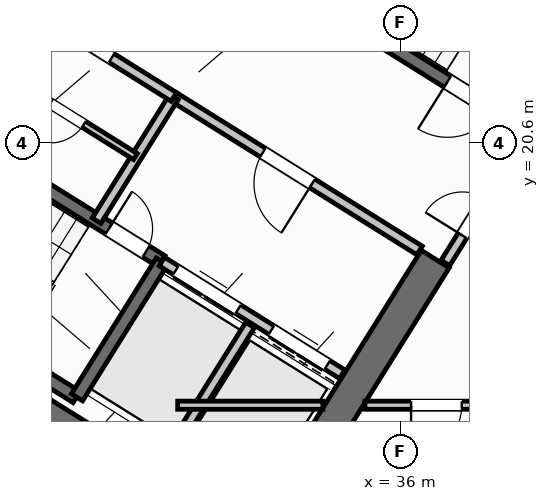
"""IFC4 building model, lengths in metres.
Left out: names, types, materials, properties, quantities, classifications, styles, units other than length and angle.
Written with IfcOpenShell. Run it as: python <this file> out.ifc"""

import sys

from ifc_helpers import new_model, si_unit, direction, frame, frame_2d, origin, place, context, subcontext, project, spatial, rectangle, extrude, source, transform, mapped, element, fill, save


model = new_model("IFC4")
c1 = context("Model", 3, precision=1e-05, world=origin(), true_north=direction((0.0, 1.0)))
c2 = subcontext(c1, "Body", "Model", "MODEL_VIEW")
j1 = project(units=[si_unit("LENGTHUNIT", "METRE"), si_unit("PLANEANGLEUNIT", "RADIAN")], contexts=[c1])
p1 = place(None, origin())
s1 = spatial("IfcSite", under=j1, at=p1, CompositionType="ELEMENT")
p2 = place(p1, origin())
s2 = spatial("IfcBuilding", under=s1, at=p2, CompositionType="ELEMENT")
p3 = place(p2, frame((0.0, 0.0, 38.4)))
s3 = spatial("IfcBuildingStorey", under=s2, at=p3, CompositionType="ELEMENT", Elevation=38.4)
p4 = place(p3, frame((33.409, 12.45, 0.0), z_axis=(0.0, 0.0, 1.0), x_axis=(-0.848051132073, 0.529914405721, 0.0)))
e1 = element("IfcWall", 1, at=p4, inside=s3, PredefinedType="SHEAR", context=c2, shape_type="SweptSolid", body=[
    extrude(rectangle(XDim=13.24, YDim=0.65, at=frame_2d((6.62, 0.0))), origin(), (0.0, 0.0, 1.0), 3.35),
])
p5 = place(p3, frame((36.683, 18.304, 0.0), z_axis=(0.0, 0.0, 1.0), x_axis=(-0.529899109053, -0.848060690178, 0.0)))
e2 = element("IfcWall", 2, at=p5, inside=s3, PredefinedType="SHEAR", context=c2, shape_type="SweptSolid", body=[
    extrude(rectangle(XDim=6.375, YDim=0.65, at=frame_2d((3.188, 0.0))), origin(), (0.0, 0.0, 1.0), 3.35),
])
p6 = place(p3, frame((29.268, 6.429, 0.0), z_axis=(0.0, 0.0, 1.0), x_axis=(-0.848049971435, 0.529916263149, 0.0)))
e3 = element("IfcWall", 3, at=p6, inside=s3, PredefinedType="STANDARD", context=c2, shape_type="SweptSolid", body=[
    extrude(rectangle(XDim=31.588, YDim=0.32, at=frame_2d((15.794, 0.0))), origin(), (0.0, 0.0, 1.0), 3.35),
])
p7 = place(p6, frame((16.362, 0.0, 0.0)))
e4 = element("IfcOpeningElement", 4, at=p7, cuts=e3, PredefinedType="OPENING", context=c2, shape_type="SweptSolid", body=[
    extrude(rectangle(XDim=1.2, YDim=2.15, at=frame_2d((0.6, 1.075))), frame((0.0, 0.17, 0.0), z_axis=(0.0, -1.0, 0.0), x_axis=(1.0, 0.0, 0.0)), (0.0, 0.0, 1.0), 0.34),
])
p8 = place(p6, frame((2.989, 0.0, 0.8)))
e5 = element("IfcOpeningElement", 5, at=p8, cuts=e3, PredefinedType="OPENING", context=c2, shape_type="SweptSolid", body=[
    extrude(rectangle(XDim=2.1, YDim=1.55, at=frame_2d((1.05, 0.775))), frame((0.0, 0.17, 0.0), z_axis=(0.0, -1.0, 0.0), x_axis=(1.0, 0.0, 0.0)), (0.0, 0.0, 1.0), 0.34),
])
p9 = place(p6, frame((8.359, 0.0, 0.8)))
e6 = element("IfcOpeningElement", 6, at=p9, cuts=e3, PredefinedType="OPENING", context=c2, shape_type="SweptSolid", body=[
    extrude(rectangle(XDim=2.1, YDim=1.55, at=frame_2d((1.05, 0.775))), frame((0.0, 0.17, 0.0), z_axis=(0.0, -1.0, 0.0), x_axis=(1.0, 0.0, 0.0)), (0.0, 0.0, 1.0), 0.34),
])
p10 = place(p6, frame((13.284, 0.0, 0.95)))
e7 = element("IfcOpeningElement", 7, at=p10, cuts=e3, PredefinedType="OPENING", context=c2, shape_type="SweptSolid", body=[
    extrude(rectangle(XDim=1.2, YDim=1.4, at=frame_2d((0.6, 0.7))), frame((0.0, 0.17, 0.0), z_axis=(0.0, -1.0, 0.0), x_axis=(1.0, 0.0, 0.0)), (0.0, 0.0, 1.0), 0.34),
])
p11 = place(p6, frame((20.39, 0.0, 0.95)))
e8 = element("IfcOpeningElement", 8, at=p11, cuts=e3, PredefinedType="OPENING", context=c2, shape_type="SweptSolid", body=[
    extrude(rectangle(XDim=1.2, YDim=1.4, at=frame_2d((0.6, 0.7))), frame((0.0, 0.17, 0.0), z_axis=(0.0, -1.0, 0.0), x_axis=(1.0, 0.0, 0.0)), (0.0, 0.0, 1.0), 0.34),
])
p12 = place(p6, frame((23.715, 0.0, 1.0)))
e9 = element("IfcOpeningElement", 9, at=p12, cuts=e3, PredefinedType="OPENING", context=c2, shape_type="SweptSolid", body=[
    extrude(rectangle(XDim=0.9, YDim=1.25, at=frame_2d((0.45, 0.625))), frame((0.0, 0.17, 0.0), z_axis=(0.0, -1.0, 0.0), x_axis=(1.0, 0.0, 0.0)), (0.0, 0.0, 1.0), 0.34),
])
p13 = place(p6, frame((27.481, 0.0, 0.8)))
e10 = element("IfcOpeningElement", 10, at=p13, cuts=e3, PredefinedType="OPENING", context=c2, shape_type="SweptSolid", body=[
    extrude(rectangle(XDim=2.1, YDim=1.55, at=frame_2d((1.05, 0.775))), frame((0.0, 0.17, 0.0), z_axis=(0.0, -1.0, 0.0), x_axis=(1.0, 0.0, 0.0)), (0.0, 0.0, 1.0), 0.34),
])
p14 = place(p3, frame((29.605, 15.581, 0.0), z_axis=(0.0, 0.0, 1.0), x_axis=(-0.848036911448, 0.529937163087, 0.0)))
e11 = element("IfcWall", 11, at=p14, inside=s3, PredefinedType="SHEAR", context=c2, shape_type="SweptSolid", body=[
    extrude(rectangle(XDim=7.46, YDim=0.26, at=frame_2d((3.73, 0.0))), origin(), (0.0, 0.0, 1.0), 3.35),
])
p15 = place(p3, frame((31.28, 18.261, 0.0), z_axis=(0.0, 0.0, 1.0), x_axis=(-0.848051618787, 0.529913626805, 0.0)))
e12 = element("IfcWall", 12, at=p15, inside=s3, PredefinedType="SHEAR", context=c2, shape_type="SweptSolid", body=[
    extrude(rectangle(XDim=7.46, YDim=0.26, at=frame_2d((3.73, 0.0))), origin(), (0.0, 0.0, 1.0), 3.35),
])
p16 = place(p15, frame((0.36, 0.0, 0.0)))
e13 = element("IfcOpeningElement", 13, at=p16, cuts=e12, PredefinedType="OPENING", context=c2, shape_type="SweptSolid", body=[
    extrude(rectangle(XDim=0.86, YDim=2.05, at=frame_2d((0.43, 1.025))), frame((0.0, 0.14, 0.0), z_axis=(0.0, -1.0, 0.0), x_axis=(1.0, 0.0, 0.0)), (0.0, 0.0, 1.0), 0.28),
])
p17 = place(p3, frame((31.288, 18.256, 0.0), z_axis=(0.0, 0.0, 1.0), x_axis=(-0.529943379326, -0.848033026897, 0.0)))
e14 = element("IfcWall", 14, at=p17, inside=s3, PredefinedType="SHEAR", context=c2, shape_type="SweptSolid", body=[
    extrude(rectangle(XDim=3.16, YDim=0.26, at=frame_2d((1.58, 0.0))), origin(), (0.0, 0.0, 1.0), 3.35),
])
p18 = place(p3, frame((38.046, 21.108, 0.0), z_axis=(0.0, 0.0, 1.0), x_axis=(-0.848054434086, 0.529909121291, 0.0)))
e15 = element("IfcWall", 15, at=p18, inside=s3, PredefinedType="SHEAR", context=c2, shape_type="SweptSolid", body=[
    extrude(rectangle(XDim=7.33, YDim=0.26, at=frame_2d((3.665, 0.0))), origin(), (0.0, 0.0, 1.0), 3.35),
])
p19 = place(p18, frame((0.22, 0.0, 0.0)))
e16 = element("IfcOpeningElement", 16, at=p19, cuts=e15, PredefinedType="OPENING", context=c2, shape_type="SweptSolid", body=[
    extrude(rectangle(XDim=1.1, YDim=2.1, at=frame_2d((0.55, 1.05))), frame((0.0, 0.14, 0.0), z_axis=(0.0, -1.0, 0.0), x_axis=(1.0, 0.0, 0.0)), (0.0, 0.0, 1.0), 0.28),
])
p20 = place(p3, frame((34.848, 16.031, 0.0), z_axis=(0.0, 0.0, 1.0), x_axis=(-0.848044042236, 0.529925751807, 0.0)))
e17 = element("IfcWall", 17, at=p20, inside=s3, PredefinedType="STANDARD", context=c2, shape_type="SweptSolid", body=[
    extrude(rectangle(XDim=4.198, YDim=0.2, at=frame_2d((2.099, 0.0))), origin(), (0.0, 0.0, 1.0), 3.34),
])
p21 = place(p20, frame((0.348, 0.0, 0.0)))
e18 = element("IfcOpeningElement", 18, at=p21, cuts=e17, PredefinedType="OPENING", context=c2, shape_type="SweptSolid", body=[
    extrude(rectangle(XDim=1.3, YDim=2.2, at=frame_2d((0.65, 1.1))), frame((0.0, 0.11, 0.0), z_axis=(0.0, -1.0, 0.0), x_axis=(1.0, 0.0, 0.0)), (0.0, 0.0, 1.0), 0.22),
])
p22 = place(p20, frame((2.423, 0.0, 0.0)))
e19 = element("IfcOpeningElement", 19, at=p22, cuts=e17, PredefinedType="OPENING", context=c2, shape_type="SweptSolid", body=[
    extrude(rectangle(XDim=1.45, YDim=2.25, at=frame_2d((0.725, 1.125))), frame((0.0, 0.11, 0.0), z_axis=(0.0, -1.0, 0.0), x_axis=(1.0, 0.0, 0.0)), (0.0, 0.0, 1.0), 0.22),
])
p23 = place(p3, frame((36.374, 18.474, 0.0), z_axis=(0.0, 0.0, 1.0), x_axis=(-0.848051071577, 0.529914502535, 0.0)))
e20 = element("IfcWall", 20, at=p23, inside=s3, PredefinedType="STANDARD", context=c2, shape_type="SweptSolid", body=[
    extrude(rectangle(XDim=5.718, YDim=0.2, at=frame_2d((2.859, 0.0))), origin(), (0.0, 0.0, 1.0), 3.34),
])
p24 = place(p23, frame((2.498, 0.0, 0.0)))
e21 = element("IfcOpeningElement", 21, at=p24, cuts=e20, PredefinedType="OPENING", context=c2, shape_type="SweptSolid", body=[
    extrude(rectangle(XDim=1.15, YDim=2.1, at=frame_2d((0.575, 1.05))), frame((0.0, 0.11, 0.0), z_axis=(0.0, -1.0, 0.0), x_axis=(1.0, 0.0, 0.0)), (0.0, 0.0, 1.0), 0.22),
])
p25 = place(p3, frame((33.029, 17.003, 0.0), z_axis=(0.0, 0.0, 1.0), x_axis=(-0.529916267533, -0.848049968695, 0.0)))
e22 = element("IfcWall", 22, at=p25, inside=s3, PredefinedType="STANDARD", context=c2, shape_type="SweptSolid", body=[
    extrude(rectangle(XDim=2.92, YDim=0.2, at=frame_2d((1.46, 0.0))), origin(), (0.0, 0.0, 1.0), 3.34),
])
p26 = place(p3, frame((31.525, 21.504, 0.0), z_axis=(0.0, 0.0, 1.0), x_axis=(-0.529907497854, -0.848055448493, 0.0)))
e23 = element("IfcWall", 23, at=p26, inside=s3, PredefinedType="STANDARD", context=c2, shape_type="SweptSolid", body=[
    extrude(rectangle(XDim=2.88, YDim=0.2, at=frame_2d((1.44, 0.0))), origin(), (0.0, 0.0, 1.0), 3.34),
])
p27 = place(p3, frame((31.525, 21.504, 0.0), z_axis=(0.0, 0.0, 1.0), x_axis=(-0.848044998614, 0.529924221305, 0.0)))
e24 = element("IfcWall", 24, at=p27, inside=s3, PredefinedType="STANDARD", context=c2, shape_type="SweptSolid", body=[
    extrude(rectangle(XDim=6.168, YDim=0.2, at=frame_2d((3.084, 0.0))), origin(), (0.0, 0.0, 1.0), 3.34),
])
p28 = place(p27, frame((4.4, 0.0, 0.0)))
e25 = element("IfcOpeningElement", 25, at=p28, cuts=e24, PredefinedType="OPENING", context=c2, shape_type="SweptSolid", body=[
    extrude(rectangle(XDim=0.86, YDim=2.05, at=frame_2d((0.43, 1.025))), frame((0.0, 0.11, 0.0), z_axis=(0.0, -1.0, 0.0), x_axis=(1.0, 0.0, 0.0)), (0.0, 0.0, 1.0), 0.22),
])
p29 = place(p27, frame((1.45, 0.0, 0.0)))
e26 = element("IfcOpeningElement", 26, at=p29, cuts=e24, PredefinedType="OPENING", context=c2, shape_type="SweptSolid", body=[
    extrude(rectangle(XDim=0.86, YDim=2.05, at=frame_2d((0.43, 1.025))), frame((0.0, 0.11, 0.0), z_axis=(0.0, -1.0, 0.0), x_axis=(1.0, 0.0, 0.0)), (0.0, 0.0, 1.0), 0.22),
])
p30 = place(p3, frame((30.766, 20.327, 0.0), z_axis=(0.0, 0.0, 1.0), x_axis=(-0.848052663127, 0.529911955482, 0.0)))
e27 = element("IfcWall", 27, at=p30, inside=s3, PredefinedType="PLUMBINGWALL", context=c2, shape_type="SweptSolid", body=[
    extrude(rectangle(XDim=3.28, YDim=0.14, at=frame_2d((1.64, 0.0))), origin(), (0.0, 0.0, 1.0), 3.34),
])
p31 = place(p30, frame((1.2, 0.0, 0.0)))
e28 = element("IfcOpeningElement", 28, at=p31, cuts=e27, PredefinedType="OPENING", context=c2, shape_type="SweptSolid", body=[
    extrude(rectangle(XDim=0.78, YDim=2.05, at=frame_2d((0.39, 1.025))), frame((0.0, 0.08, 0.0), z_axis=(0.0, -1.0, 0.0), x_axis=(1.0, 0.0, 0.0)), (0.0, 0.0, 1.0), 0.16),
])
p32 = place(p3, frame((32.164, 10.374, 0.0), z_axis=(0.0, 0.0, 1.0), x_axis=(-0.848044107957, 0.529925646633, 0.0)))
e29 = element("IfcWall", 29, at=p32, inside=s3, PredefinedType="PARTITIONING", context=c2, shape_type="SweptSolid", body=[
    extrude(rectangle(XDim=15.57, YDim=0.16, at=frame_2d((7.785, 0.0))), origin(), (0.0, 0.0, 1.0), 3.34),
])
p33 = place(p32, frame((10.83, 0.0, 0.0)))
e30 = element("IfcOpeningElement", 30, at=p33, cuts=e29, PredefinedType="OPENING", context=c2, shape_type="SweptSolid", body=[
    extrude(rectangle(XDim=1.0, YDim=2.1, at=frame_2d((0.5, 1.05))), frame((0.0, 0.09, 0.0), z_axis=(0.0, -1.0, 0.0), x_axis=(1.0, 0.0, 0.0)), (0.0, 0.0, 1.0), 0.18),
])
p34 = place(p3, frame((29.72, 8.859, 0.0), z_axis=(0.0, 0.0, 1.0), x_axis=(-0.848049134363, 0.529917602752, 0.0)))
e31 = element("IfcWall", 31, at=p34, inside=s3, PredefinedType="PLUMBINGWALL", context=c2, shape_type="SweptSolid", body=[
    extrude(rectangle(XDim=14.3, YDim=0.14, at=frame_2d((7.15, 0.0))), origin(), (0.0, 0.0, 1.0), 3.34),
])
p35 = place(p34, frame((9.57, 0.0, 0.0)))
e32 = element("IfcOpeningElement", 32, at=p35, cuts=e31, PredefinedType="OPENING", context=c2, shape_type="SweptSolid", body=[
    extrude(rectangle(XDim=0.92, YDim=2.08, at=frame_2d((0.46, 1.04))), frame((0.0, 0.08, 0.0), z_axis=(0.0, -1.0, 0.0), x_axis=(1.0, 0.0, 0.0)), (0.0, 0.0, 1.0), 0.16),
])
p36 = place(p3, frame((38.451, 20.737, 0.0), z_axis=(0.0, 0.0, 1.0), x_axis=(-0.529924799939, -0.848044637038, 0.0)))
e33 = element("IfcWall", 33, at=p36, inside=s3, PredefinedType="STANDARD", context=c2, shape_type="SweptSolid", body=[
    extrude(rectangle(XDim=2.96, YDim=0.2, at=frame_2d((1.48, 0.0))), origin(), (0.0, 0.0, 1.0), 3.34),
])
p37 = place(p36, frame((1.46, 0.0, 0.0)))
e34 = element("IfcOpeningElement", 34, at=p37, cuts=e33, PredefinedType="OPENING", context=c2, shape_type="SweptSolid", body=[
    extrude(rectangle(XDim=0.86, YDim=2.05, at=frame_2d((0.43, 1.025))), frame((0.0, 0.11, 0.0), z_axis=(0.0, -1.0, 0.0), x_axis=(1.0, 0.0, 0.0)), (0.0, 0.0, 1.0), 0.22),
])
p38 = place(p3, frame((31.6, 15.42, 0.0), z_axis=(0.0, 0.0, 1.0), x_axis=(1.0, 0.0, 0.0)))
e35 = element("IfcWall", 35, at=p38, inside=s3, PredefinedType="PARTITIONING", context=c2, shape_type="SweptSolid", body=[
    extrude(rectangle(XDim=2.866, YDim=0.16, at=frame_2d((1.433, 0.0))), origin(), (0.0, 0.0, 1.0), 3.34),
])
p39 = place(p3, frame((35.296, 15.42, 0.0), z_axis=(0.0, 0.0, 1.0), x_axis=(1.0, 0.0, 0.0)))
e36 = element("IfcWall", 36, at=p39, inside=s3, PredefinedType="PARTITIONING", context=c2, shape_type="SweptSolid", body=[
    extrude(rectangle(XDim=15.311, YDim=0.16, at=frame_2d((7.655, 0.0))), origin(), (0.0, 0.0, 1.0), 3.34),
])
p40 = place(p39, frame((0.91, 0.0, 0.0)))
e37 = element("IfcOpeningElement", 37, at=p40, cuts=e36, PredefinedType="OPENING", context=c2, shape_type="SweptSolid", body=[
    extrude(rectangle(XDim=1.0, YDim=2.1, at=frame_2d((0.5, 1.05))), frame((0.0, 0.09, 0.0), z_axis=(0.0, -1.0, 0.0), x_axis=(1.0, 0.0, 0.0)), (0.0, 0.0, 1.0), 0.18),
])
p41 = place(p39, frame((8.74, 0.0, 0.0)))
e38 = element("IfcOpeningElement", 38, at=p41, cuts=e36, PredefinedType="OPENING", context=c2, shape_type="SweptSolid", body=[
    extrude(rectangle(XDim=1.0, YDim=2.1, at=frame_2d((0.5, 1.05))), frame((0.0, 0.09, 0.0), z_axis=(0.0, -1.0, 0.0), x_axis=(1.0, 0.0, 0.0)), (0.0, 0.0, 1.0), 0.18),
])
m1 = source(origin(), c2, "Body", "SweptSolid", [
    extrude(rectangle(XDim=0.86, YDim=2.05, at=frame_2d((0.43, 1.025))), frame((0.0, 0.025, 0.0), z_axis=(0.0, -1.0, 0.0), x_axis=(1.0, 0.0, 0.0)), (0.0, 0.0, 1.0), 0.05),
])
p42 = place(p16, frame((0.86, 0.0, 0.0), z_axis=(0.0, 0.0, 1.0), x_axis=(-1.0, 0.0, 0.0)))
e39 = element("IfcDoor", 39, at=p42, inside=s3, OperationType="SINGLE_SWING_LEFT", PredefinedType="DOOR", context=c2, shape_type="MappedRepresentation", body=[
    mapped(m1, transform((0.0, 0.0, 0.0), scale=1.0)),
])
fill(e13, e39)
m2 = source(origin(), c2, "Body", "SweptSolid", [
    extrude(rectangle(XDim=1.1, YDim=2.1, at=frame_2d((0.55, 1.05))), frame((0.0, 0.025, 0.0), z_axis=(0.0, -1.0, 0.0), x_axis=(1.0, 0.0, 0.0)), (0.0, 0.0, 1.0), 0.05),
])
p43 = place(p19, origin())
e40 = element("IfcDoor", 40, at=p43, inside=s3, OperationType="SINGLE_SWING_RIGHT", PredefinedType="DOOR", context=c2, shape_type="MappedRepresentation", body=[
    mapped(m2, transform((0.0, 0.0, 0.0), scale=1.0)),
])
fill(e16, e40)
m3 = source(origin(), c2, "Body", "SweptSolid", [
    extrude(rectangle(XDim=1.15, YDim=2.1, at=frame_2d((0.575, 1.05))), frame((0.0, 0.025, 0.0), z_axis=(0.0, -1.0, 0.0), x_axis=(1.0, 0.0, 0.0)), (0.0, 0.0, 1.0), 0.05),
])
p44 = place(p24, origin())
e41 = element("IfcDoor", 41, at=p44, inside=s3, OperationType="SINGLE_SWING_LEFT", PredefinedType="DOOR", context=c2, shape_type="MappedRepresentation", body=[
    mapped(m3, transform((0.0, 0.0, 0.0), scale=1.0)),
])
fill(e21, e41)
m4 = source(origin(), c2, "Body", "SweptSolid", [
    extrude(rectangle(XDim=1.3, YDim=2.2, at=frame_2d((0.65, 1.1))), frame((0.0, 0.025, 0.0), z_axis=(0.0, -1.0, 0.0), x_axis=(1.0, 0.0, 0.0)), (0.0, 0.0, 1.0), 0.05),
])
p45 = place(p21, origin())
e42 = element("IfcDoor", 42, at=p45, inside=s3, OperationType="DOUBLE_DOOR_SLIDING", PredefinedType="DOOR", context=c2, shape_type="MappedRepresentation", body=[
    mapped(m4, transform((0.0, 0.0, 0.0), scale=1.0)),
])
fill(e18, e42)
m5 = source(origin(), c2, "Body", "SweptSolid", [
    extrude(rectangle(XDim=1.45, YDim=2.25, at=frame_2d((0.725, 1.125))), frame((0.0, 0.025, 0.0), z_axis=(0.0, -1.0, 0.0), x_axis=(1.0, 0.0, 0.0)), (0.0, 0.0, 1.0), 0.05),
])
p46 = place(p22, origin())
e43 = element("IfcDoor", 43, at=p46, inside=s3, OperationType="DOUBLE_DOOR_SLIDING", PredefinedType="DOOR", context=c2, shape_type="MappedRepresentation", body=[
    mapped(m5, transform((0.0, 0.0, 0.0), scale=1.0)),
])
fill(e19, e43)
p47 = place(p29, frame((0.86, 0.0, 0.0), z_axis=(0.0, 0.0, 1.0), x_axis=(-1.0, 0.0, 0.0)))
e44 = element("IfcDoor", 44, at=p47, inside=s3, OperationType="SINGLE_SWING_LEFT", PredefinedType="DOOR", context=c2, shape_type="MappedRepresentation", body=[
    mapped(m1, transform((0.0, 0.0, 0.0), scale=1.0)),
])
fill(e26, e44)
m6 = source(origin(), c2, "Body", "SweptSolid", [
    extrude(rectangle(XDim=0.78, YDim=2.05, at=frame_2d((0.39, 1.025))), frame((0.0, 0.025, 0.0), z_axis=(0.0, -1.0, 0.0), x_axis=(1.0, 0.0, 0.0)), (0.0, 0.0, 1.0), 0.05),
])
p48 = place(p31, origin())
e45 = element("IfcDoor", 45, at=p48, inside=s3, OperationType="SINGLE_SWING_RIGHT", PredefinedType="DOOR", context=c2, shape_type="MappedRepresentation", body=[
    mapped(m6, transform((0.0, 0.0, 0.0), scale=1.0)),
])
fill(e28, e45)
p49 = place(p37, frame((0.86, 0.0, 0.0), z_axis=(0.0, 0.0, 1.0), x_axis=(-1.0, 0.0, 0.0)))
e46 = element("IfcDoor", 46, at=p49, inside=s3, OperationType="SINGLE_SWING_LEFT", PredefinedType="DOOR", context=c2, shape_type="MappedRepresentation", body=[
    mapped(m1, transform((0.0, 0.0, 0.0), scale=1.0)),
])
fill(e34, e46)
m7 = source(origin(), c2, "Body", "SweptSolid", [
    extrude(rectangle(XDim=1.0, YDim=2.1, at=frame_2d((0.5, 1.05))), frame((0.0, 0.025, 0.0), z_axis=(0.0, -1.0, 0.0), x_axis=(1.0, 0.0, 0.0)), (0.0, 0.0, 1.0), 0.05),
])
p50 = place(p40, frame((1.0, 0.0, 0.0), z_axis=(0.0, 0.0, 1.0), x_axis=(-1.0, 0.0, 0.0)))
e47 = element("IfcDoor", 47, at=p50, inside=s3, OperationType="SINGLE_SWING_RIGHT", PredefinedType="DOOR", context=c2, shape_type="MappedRepresentation", body=[
    mapped(m7, transform((0.0, 0.0, 0.0), scale=1.0)),
])
fill(e37, e47)
save(model, sys.argv[1])
